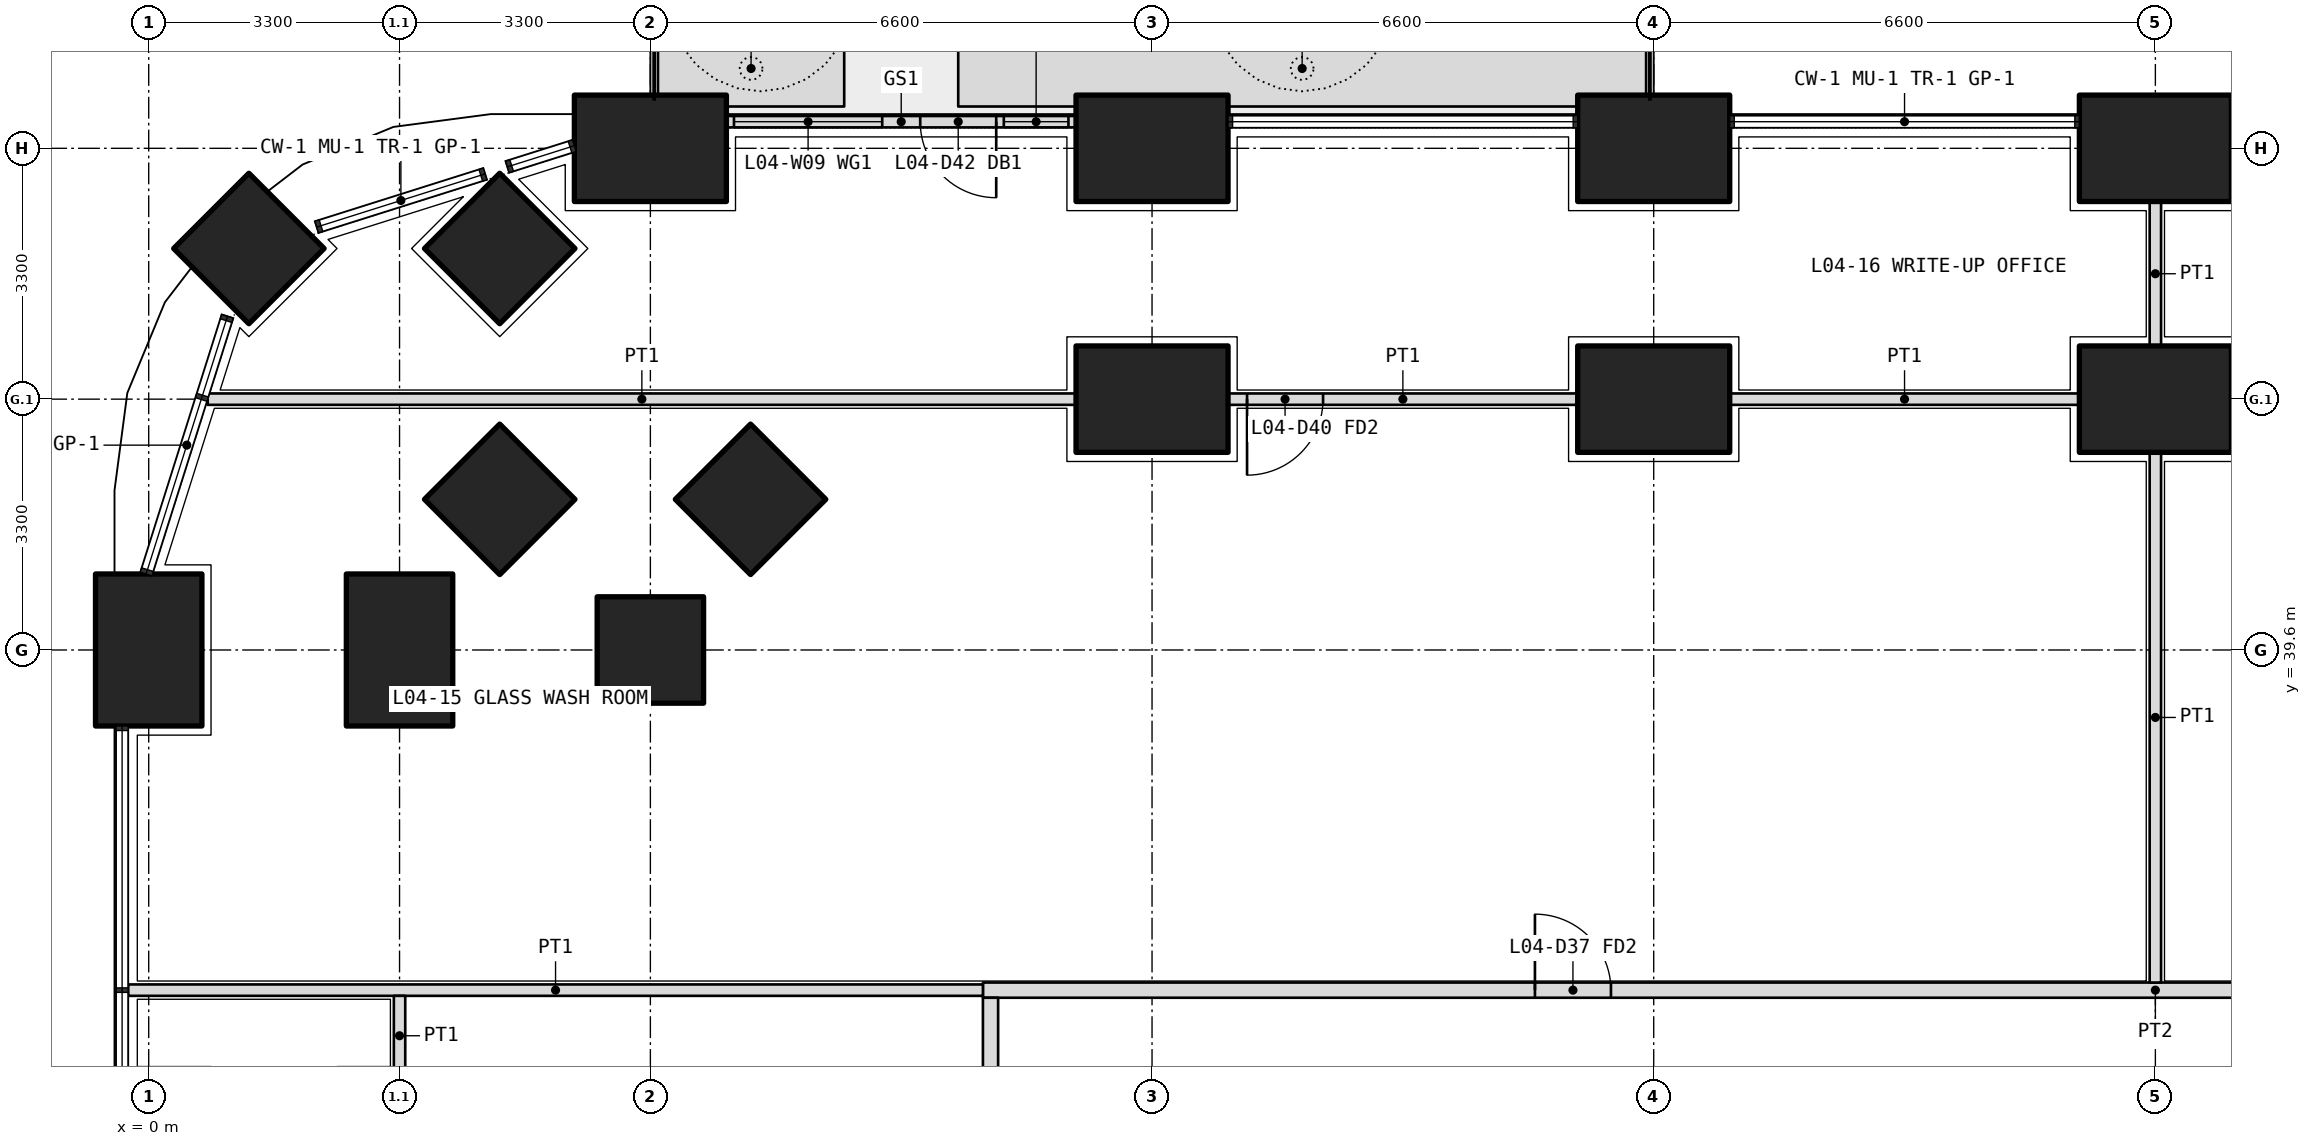
"""IFC4 building model, lengths in metres.
Left out: names, types, materials, properties, quantities, classifications, styles, units other than length and angle.
Written with IfcOpenShell. Run it as: python <this file> out.ifc"""

import sys

from ifc_helpers import new_model, si_unit, direction, frame, frame_2d, origin, origin_2d, place, context, subcontext, project, spatial, polyline, rectangle, outline, extrude, element, fill, save


model = new_model("IFC4")
c1 = context("Model", 3, precision=1e-05, world=origin(), true_north=direction((0.0, 1.0)))
c2 = subcontext(c1, "Body", "Model", "MODEL_VIEW")
j1 = project(units=[si_unit("LENGTHUNIT", "METRE"), si_unit("PLANEANGLEUNIT", "RADIAN")], contexts=[c1])
p1 = place(None, origin())
s1 = spatial("IfcSite", under=j1, at=p1, CompositionType="ELEMENT")
p2 = place(p1, origin())
s2 = spatial("IfcBuilding", under=s1, at=p2, CompositionType="ELEMENT")
p3 = place(p2, frame((0.0, 0.0, 21.3)))
s3 = spatial("IfcBuildingStorey", under=s2, at=p3, CompositionType="ELEMENT", Elevation=21.3)
p4 = place(p3, frame((1.318, 44.882, 0.0), z_axis=(0.0, 0.0, 1.0), x_axis=(0.707106781187, 0.707106781187, 0.0)))
e1 = element("IfcColumn", 1, at=p4, inside=s3, PredefinedType="COLUMN", context=c2, shape_type="SweptSolid", body=[
    extrude(rectangle(XDim=1.4, YDim=1.4, at=origin_2d()), origin(), (0.0, 0.0, 1.0), 4.2),
])
for number, where, z_axis, x_axis in (
    (2, (0.0, 39.6, 0.0), (0.0, 0.0, 1.0), (0.0, 1.0, 0.0)),
    (3, (6.6, 46.2, 0.0), (0.0, 0.0, 1.0), (1.0, 0.0, 0.0)),
    (4, (13.2, 46.2, 0.0), (0.0, 0.0, 1.0), (1.0, 0.0, 0.0)),
    (5, (19.8, 46.2, 0.0), (0.0, 0.0, 1.0), (1.0, 0.0, 0.0)),
    (6, (26.4, 46.2, 0.0), (0.0, 0.0, 1.0), (1.0, 0.0, 0.0)),
):
    element("IfcColumn", number, at=place(p3, frame(where, z_axis=z_axis, x_axis=x_axis)), inside=s3, PredefinedType="COLUMN", context=c2, shape_type="SweptSolid", body=[
        extrude(rectangle(XDim=2.0, YDim=1.4, at=origin_2d()), origin(), (0.0, 0.0, 1.0), 4.2),
    ])
for number, where, z_axis, x_axis in (
    (7, (6.6, 39.6, 0.0), (0.0, 0.0, 1.0), (1.0, 0.0, 0.0)),
    (8, (4.618, 44.882, 0.0), (0.0, 0.0, 1.0), (0.707, 0.707, 0.0)),
):
    element("IfcColumn", number, at=place(p3, frame(where, z_axis=z_axis, x_axis=x_axis)), inside=s3, PredefinedType="COLUMN", context=c2, shape_type="SweptSolid", body=[
        extrude(rectangle(XDim=1.4, YDim=1.4, at=origin_2d()), origin(), (0.0, 0.0, 1.0), 4.2),
    ])
p5 = place(p3, frame((3.3, 39.6, 0.0), z_axis=(0.0, 0.0, 1.0), x_axis=(0.0, 1.0, 0.0)))
e9 = element("IfcColumn", 9, at=p5, inside=s3, PredefinedType="COLUMN", context=c2, shape_type="SweptSolid", body=[
    extrude(rectangle(XDim=2.0, YDim=1.4, at=origin_2d()), origin(), (0.0, 0.0, 1.0), 4.2),
])
p6 = place(p3, frame((4.618, 41.582, 0.0), z_axis=(0.0, 0.0, 1.0), x_axis=(0.707106781187, 0.707106781187, 0.0)))
e10 = element("IfcColumn", 10, at=p6, inside=s3, PredefinedType="COLUMN", context=c2, shape_type="SweptSolid", body=[
    extrude(rectangle(XDim=1.4, YDim=1.4, at=origin_2d()), origin(), (0.0, 0.0, 1.0), 4.2),
])
for number, where, z_axis, x_axis in (
    (11, (13.2, 42.9, 0.0), (0.0, 0.0, 1.0), (1.0, 0.0, 0.0)),
    (12, (19.8, 42.9, 0.0), (0.0, 0.0, 1.0), (1.0, 0.0, 0.0)),
    (13, (26.4, 42.9, 0.0), (0.0, 0.0, 1.0), (1.0, 0.0, 0.0)),
):
    element("IfcColumn", number, at=place(p3, frame(where, z_axis=z_axis, x_axis=x_axis)), inside=s3, PredefinedType="COLUMN", context=c2, shape_type="SweptSolid", body=[
        extrude(rectangle(XDim=2.0, YDim=1.4, at=origin_2d()), origin(), (0.0, 0.0, 1.0), 4.2),
    ])
p7 = place(p3, frame((7.918, 41.582, 0.0), z_axis=(0.0, 0.0, 1.0), x_axis=(0.707106781187, 0.707106781187, 0.0)))
e14 = element("IfcColumn", 14, at=p7, inside=s3, PredefinedType="COLUMN", context=c2, shape_type="SweptSolid", body=[
    extrude(rectangle(XDim=1.4, YDim=1.4, at=origin_2d()), origin(), (0.0, 0.0, 1.0), 4.2),
])
p8 = place(p3, origin())
e15 = element("IfcWall", 15, at=p8, inside=s3, PredefinedType="USERDEFINED", context=c2, shape_type="SweptSolid", body=[
    extrude(outline(polyline([(6.7, 46.75), (9.15, 46.75), (9.15, 47.75), (6.7, 47.75), (6.7, 46.75)]), holes=[polyline([(6.85, 46.9), (9.0, 46.9), (9.0, 47.6), (6.85, 47.6), (6.85, 46.9)])]), origin(), (0.0, 0.0, 1.0), 1.05),
])
p9 = place(p3, origin())
e16 = element("IfcWall", 16, at=p9, inside=s3, PredefinedType="USERDEFINED", context=c2, shape_type="SweptSolid", body=[
    extrude(outline(polyline([(10.65, 46.75), (19.7, 46.75), (19.7, 47.75), (10.65, 47.75), (10.65, 46.75)]), holes=[polyline([(10.8, 46.9), (19.55, 46.9), (19.55, 47.6), (10.8, 47.6), (10.8, 46.9)])]), origin(), (0.0, 0.0, 1.0), 1.05),
])
p10 = place(p3, frame((12.2, 46.55, 0.0), z_axis=(0.0, 0.0, 1.0), x_axis=(-1.0, 0.0, 0.0)))
e17 = element("IfcWall", 17, at=p10, inside=s3, PredefinedType="SOLIDWALL", context=c2, shape_type="SweptSolid", body=[
    extrude(rectangle(XDim=4.6, YDim=0.15, at=frame_2d((2.3, 0.0))), origin(), (0.0, 0.0, 1.0), 2.7),
])
p11 = place(p10, frame((1.05, 0.0, 0.0)))
e18 = element("IfcOpeningElement", 18, at=p11, cuts=e17, PredefinedType="OPENING", context=c2, shape_type="SweptSolid", body=[
    extrude(rectangle(XDim=1.0, YDim=2.4, at=frame_2d((0.5, 1.2))), frame((0.0, 0.085, 0.0), z_axis=(0.0, -1.0, 0.0), x_axis=(1.0, 0.0, 0.0)), (0.0, 0.0, 1.0), 0.17),
])
p12 = place(p10, frame((0.1, 0.0, 0.1)))
e19 = element("IfcOpeningElement", 19, at=p12, cuts=e17, PredefinedType="OPENING", context=c2, shape_type="SweptSolid", body=[
    extrude(rectangle(XDim=0.85, YDim=2.3, at=frame_2d((0.425, 1.15))), frame((0.0, 0.085, 0.0), z_axis=(0.0, -1.0, 0.0), x_axis=(1.0, 0.0, 0.0)), (0.0, 0.0, 1.0), 0.17),
])
p13 = place(p10, frame((2.55, 0.0, 0.1)))
e20 = element("IfcOpeningElement", 20, at=p13, cuts=e17, PredefinedType="OPENING", context=c2, shape_type="SweptSolid", body=[
    extrude(rectangle(XDim=1.95, YDim=2.3, at=frame_2d((0.975, 1.15))), frame((0.0, 0.085, 0.0), z_axis=(0.0, -1.0, 0.0), x_axis=(1.0, 0.0, 0.0)), (0.0, 0.0, 1.0), 0.17),
])
p14 = place(p3, frame((10.975, 35.125, 0.0), z_axis=(0.0, 0.0, 1.0), x_axis=(1.0, 0.0, 0.0)))
e21 = element("IfcWall", 21, at=p14, inside=s3, PredefinedType="PARTITIONING", context=c2, shape_type="SweptSolid", body=[
    extrude(rectangle(XDim=30.85, YDim=0.2, at=frame_2d((15.425, 0.0))), origin(), (0.0, 0.0, 1.0), 2.85),
])
p15 = place(p14, frame((7.262, 0.0, 0.0)))
e22 = element("IfcOpeningElement", 22, at=p15, cuts=e21, PredefinedType="OPENING", context=c2, shape_type="SweptSolid", body=[
    extrude(rectangle(XDim=1.0, YDim=2.1, at=frame_2d((0.5, 1.05))), frame((0.0, 0.11, 0.0), z_axis=(0.0, -1.0, 0.0), x_axis=(1.0, 0.0, 0.0)), (0.0, 0.0, 1.0), 0.22),
])
p16 = place(p14, frame((22.587, 0.0, 0.0)))
e23 = element("IfcOpeningElement", 23, at=p16, cuts=e21, PredefinedType="OPENING", context=c2, shape_type="SweptSolid", body=[
    extrude(rectangle(XDim=1.0, YDim=2.1, at=frame_2d((0.5, 1.05))), frame((0.0, 0.11, 0.0), z_axis=(0.0, -1.0, 0.0), x_axis=(1.0, 0.0, 0.0)), (0.0, 0.0, 1.0), 0.22),
])
p17 = place(p3, frame((11.075, 11.175, 0.0), z_axis=(0.0, 0.0, 1.0), x_axis=(0.0, 1.0, 0.0)))
e24 = element("IfcWall", 24, at=p17, inside=s3, PredefinedType="PARTITIONING", context=c2, shape_type="SweptSolid", body=[
    extrude(rectangle(XDim=23.85, YDim=0.2, at=frame_2d((11.925, 0.0))), origin(), (0.0, 0.0, 1.0), 2.85),
])
p18 = place(p17, frame((0.462, 0.0, 0.0)))
e25 = element("IfcOpeningElement", 25, at=p18, cuts=e24, PredefinedType="OPENING", context=c2, shape_type="SweptSolid", body=[
    extrude(rectangle(XDim=1.0, YDim=2.1, at=frame_2d((0.5, 1.05))), frame((0.0, 0.11, 0.0), z_axis=(0.0, -1.0, 0.0), x_axis=(1.0, 0.0, 0.0)), (0.0, 0.0, 1.0), 0.22),
])
p19 = place(p17, frame((2.575, 0.0, 0.0)))
e26 = element("IfcOpeningElement", 26, at=p19, cuts=e24, PredefinedType="OPENING", context=c2, shape_type="SweptSolid", body=[
    extrude(rectangle(XDim=1.0, YDim=2.1, at=frame_2d((0.5, 1.05))), frame((0.0, 0.11, 0.0), z_axis=(0.0, -1.0, 0.0), x_axis=(1.0, 0.0, 0.0)), (0.0, 0.0, 1.0), 0.22),
])
p20 = place(p17, frame((5.625, 0.0, 0.0)))
e27 = element("IfcOpeningElement", 27, at=p20, cuts=e24, PredefinedType="OPENING", context=c2, shape_type="SweptSolid", body=[
    extrude(rectangle(XDim=0.9, YDim=2.1, at=frame_2d((0.45, 1.05))), frame((0.0, 0.11, 0.0), z_axis=(0.0, -1.0, 0.0), x_axis=(1.0, 0.0, 0.0)), (0.0, 0.0, 1.0), 0.22),
])
p21 = place(p17, frame((9.425, 0.0, 0.0)))
e28 = element("IfcOpeningElement", 28, at=p21, cuts=e24, PredefinedType="OPENING", context=c2, shape_type="SweptSolid", body=[
    extrude(rectangle(XDim=0.9, YDim=2.1, at=frame_2d((0.45, 1.05))), frame((0.0, 0.11, 0.0), z_axis=(0.0, -1.0, 0.0), x_axis=(1.0, 0.0, 0.0)), (0.0, 0.0, 1.0), 0.22),
])
p22 = place(p17, frame((12.975, 0.0, 0.0)))
e29 = element("IfcOpeningElement", 29, at=p22, cuts=e24, PredefinedType="OPENING", context=c2, shape_type="SweptSolid", body=[
    extrude(rectangle(XDim=1.0, YDim=2.1, at=frame_2d((0.5, 1.05))), frame((0.0, 0.11, 0.0), z_axis=(0.0, -1.0, 0.0), x_axis=(1.0, 0.0, 0.0)), (0.0, 0.0, 1.0), 0.22),
])
p23 = place(p17, frame((16.375, 0.0, 0.0)))
e30 = element("IfcOpeningElement", 30, at=p23, cuts=e24, PredefinedType="OPENING", context=c2, shape_type="SweptSolid", body=[
    extrude(rectangle(XDim=1.0, YDim=2.1, at=frame_2d((0.5, 1.05))), frame((0.0, 0.11, 0.0), z_axis=(0.0, -1.0, 0.0), x_axis=(1.0, 0.0, 0.0)), (0.0, 0.0, 1.0), 0.22),
])
p24 = place(p17, frame((20.738, 0.0, 0.0)))
e31 = element("IfcOpeningElement", 31, at=p24, cuts=e24, PredefinedType="OPENING", context=c2, shape_type="SweptSolid", body=[
    extrude(rectangle(XDim=1.0, YDim=2.1, at=frame_2d((0.5, 1.05))), frame((0.0, 0.11, 0.0), z_axis=(0.0, -1.0, 0.0), x_axis=(1.0, 0.0, 0.0)), (0.0, 0.0, 1.0), 0.22),
])
p25 = place(p3, frame((-0.27, 35.125, 0.0), z_axis=(0.0, 0.0, 1.0), x_axis=(1.0, 0.0, 0.0)))
e32 = element("IfcWall", 32, at=p25, inside=s3, PredefinedType="PARTITIONING", context=c2, shape_type="SweptSolid", body=[
    extrude(rectangle(XDim=11.245, YDim=0.15, at=frame_2d((5.623, 0.0))), origin(), (0.0, 0.0, 1.0), 2.7),
])
p26 = place(p3, frame((25.4, 42.9, 0.0), z_axis=(0.0, 0.0, 1.0), x_axis=(-1.0, 0.0, 0.0)))
e33 = element("IfcWall", 33, at=p26, inside=s3, PredefinedType="PARTITIONING", context=c2, shape_type="SweptSolid", body=[
    extrude(rectangle(XDim=4.6, YDim=0.15, at=frame_2d((2.3, 0.0))), origin(), (0.0, 0.0, 1.0), 3.9),
])
p27 = place(p3, frame((18.8, 42.9, 0.0), z_axis=(0.0, 0.0, 1.0), x_axis=(-1.0, 0.0, 0.0)))
e34 = element("IfcWall", 34, at=p27, inside=s3, PredefinedType="PARTITIONING", context=c2, shape_type="SweptSolid", body=[
    extrude(rectangle(XDim=4.6, YDim=0.15, at=frame_2d((2.3, 0.0))), origin(), (0.0, 0.0, 1.0), 3.9),
])
p28 = place(p27, frame((3.35, 0.0, 0.0)))
e35 = element("IfcOpeningElement", 35, at=p28, cuts=e34, PredefinedType="OPENING", context=c2, shape_type="SweptSolid", body=[
    extrude(rectangle(XDim=1.0, YDim=2.1, at=frame_2d((0.5, 1.05))), frame((0.0, 0.085, 0.0), z_axis=(0.0, -1.0, 0.0), x_axis=(1.0, 0.0, 0.0)), (0.0, 0.0, 1.0), 0.17),
])
p29 = place(p3, frame((12.2, 42.9, 0.0), z_axis=(0.0, 0.0, 1.0), x_axis=(-1.0, 0.0, 0.0)))
e36 = element("IfcWall", 36, at=p29, inside=s3, PredefinedType="PARTITIONING", context=c2, shape_type="SweptSolid", body=[
    extrude(rectangle(XDim=11.424, YDim=0.15, at=frame_2d((5.712, 0.0))), origin(), (0.0, 0.0, 1.0), 2.7),
])
p30 = place(p3, frame((26.4, 45.5, 0.0), z_axis=(0.0, 0.0, 1.0), x_axis=(0.0, -1.0, 0.0)))
e37 = element("IfcWall", 37, at=p30, inside=s3, PredefinedType="PARTITIONING", context=c2, shape_type="SweptSolid", body=[
    extrude(rectangle(XDim=1.9, YDim=0.15, at=frame_2d((0.95, 0.0))), origin(), (0.0, 0.0, 1.0), 2.85),
])
p31 = place(p3, frame((26.4, 42.2, 0.0), z_axis=(0.0, 0.0, 1.0), x_axis=(0.0, -1.0, 0.0)))
e38 = element("IfcWall", 38, at=p31, inside=s3, PredefinedType="PARTITIONING", context=c2, shape_type="SweptSolid", body=[
    extrude(rectangle(XDim=6.975, YDim=0.15, at=frame_2d((3.487, 0.0))), origin(), (0.0, 0.0, 1.0), 2.85),
])
p32 = place(p3, frame((3.3, 35.05, 0.0), z_axis=(0.0, 0.0, 1.0), x_axis=(0.0, -1.0, 0.0)))
e39 = element("IfcWall", 39, at=p32, inside=s3, PredefinedType="PARTITIONING", context=c2, shape_type="SweptSolid", body=[
    extrude(rectangle(XDim=1.05, YDim=0.15, at=frame_2d((0.525, 0.0))), origin(), (0.0, 0.0, 1.0), 3.9),
])
p33 = place(p11, origin())
e40 = element("IfcDoor", 40, at=p33, inside=s3, OperationType="SINGLE_SWING_LEFT", PredefinedType="DOOR", context=c2, shape_type="SweptSolid", body=[
    extrude(rectangle(XDim=1.0, YDim=2.4, at=frame_2d((0.5, 1.2))), frame((0.0, 0.025, 0.0), z_axis=(0.0, -1.0, 0.0), x_axis=(1.0, 0.0, 0.0)), (0.0, 0.0, 1.0), 0.05),
])
fill(e18, e40)
p34 = place(p12, origin())
e41 = element("IfcWindow", 41, at=p34, inside=s3, PartitioningType="SINGLE_PANEL", PredefinedType="WINDOW", context=c2, shape_type="SweptSolid", body=[
    extrude(rectangle(XDim=0.85, YDim=2.3, at=frame_2d((0.425, 1.15))), frame((0.0, 0.03, 0.0), z_axis=(0.0, -1.0, 0.0), x_axis=(1.0, 0.0, 0.0)), (0.0, 0.0, 1.0), 0.06),
])
fill(e19, e41)
p35 = place(p13, origin())
e42 = element("IfcWindow", 42, at=p35, inside=s3, PartitioningType="SINGLE_PANEL", PredefinedType="WINDOW", context=c2, shape_type="SweptSolid", body=[
    extrude(rectangle(XDim=1.95, YDim=2.3, at=frame_2d((0.975, 1.15))), frame((0.0, 0.03, 0.0), z_axis=(0.0, -1.0, 0.0), x_axis=(1.0, 0.0, 0.0)), (0.0, 0.0, 1.0), 0.06),
])
fill(e20, e42)
p36 = place(p15, origin())
e43 = element("IfcDoor", 43, at=p36, inside=s3, OperationType="SINGLE_SWING_LEFT", PredefinedType="DOOR", context=c2, shape_type="SweptSolid", body=[
    extrude(rectangle(XDim=1.0, YDim=2.1, at=frame_2d((0.5, 1.05))), frame((0.0, 0.025, 0.0), z_axis=(0.0, -1.0, 0.0), x_axis=(1.0, 0.0, 0.0)), (0.0, 0.0, 1.0), 0.05),
])
fill(e22, e43)
p37 = place(p28, origin())
e44 = element("IfcDoor", 44, at=p37, inside=s3, OperationType="SINGLE_SWING_RIGHT", PredefinedType="DOOR", context=c2, shape_type="SweptSolid", body=[
    extrude(rectangle(XDim=1.0, YDim=2.1, at=frame_2d((0.5, 1.05))), frame((0.0, 0.025, 0.0), z_axis=(0.0, -1.0, 0.0), x_axis=(1.0, 0.0, 0.0)), (0.0, 0.0, 1.0), 0.05),
])
fill(e35, e44)
save(model, sys.argv[1])
